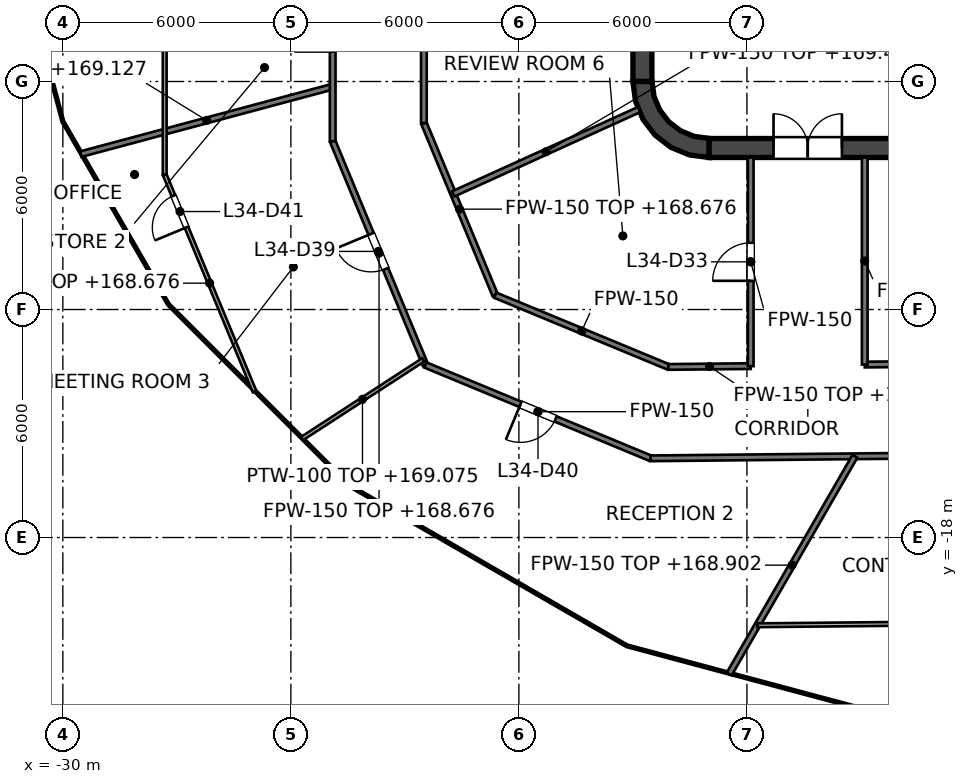
"""IFC4 building model, lengths in metres.
Left out: names, types, materials, properties, quantities, classifications, styles, units other than length and angle.
Written with IfcOpenShell. Run it as: python <this file> out.ifc"""

import sys

from ifc_helpers import new_model, si_unit, direction, frame, frame_2d, origin, place, context, subcontext, project, spatial, polyline, rectangle, outline, extrude, element, fill, save


model = new_model("IFC4")
c1 = context("Model", 3, precision=1e-05, world=origin(), true_north=direction((0.0, 1.0)))
c2 = subcontext(c1, "Body", "Model", "MODEL_VIEW")
j1 = project(units=[si_unit("LENGTHUNIT", "METRE"), si_unit("PLANEANGLEUNIT", "RADIAN")], contexts=[c1])
p1 = place(None, origin())
s1 = spatial("IfcSite", under=j1, at=p1, CompositionType="ELEMENT")
p2 = place(p1, origin())
s2 = spatial("IfcBuilding", under=s1, at=p2, CompositionType="ELEMENT")
p3 = place(p2, frame((0.0, 0.0, 165.6)))
s3 = spatial("IfcBuildingStorey", under=s2, at=p3, CompositionType="ELEMENT", Elevation=165.6)
p4 = place(p3, frame((-13.0, -7.75, 0.0), z_axis=(0.0, 0.0, 1.0), x_axis=(1.0, 0.0, 0.0)))
e1 = element("IfcWall", 1, at=p4, inside=s3, PredefinedType="SHEAR", context=c2, shape_type="SweptSolid", body=[
    extrude(rectangle(XDim=26.0, YDim=0.5, at=frame_2d((13.0, 0.0))), origin(), (0.0, 0.0, 1.0), 4.0),
])
p5 = place(p4, frame((1.7, 0.0, 0.0)))
e2 = element("IfcOpeningElement", 2, at=p5, cuts=e1, PredefinedType="OPENING", context=c2, shape_type="SweptSolid", body=[
    extrude(rectangle(XDim=1.8, YDim=2.1, at=frame_2d((0.9, 1.05))), frame((0.0, 0.25, 0.0), z_axis=(0.0, -1.0, 0.0), x_axis=(1.0, 0.0, 0.0)), (0.0, 0.0, 1.0), 0.5),
])
p6 = place(p4, frame((22.5, 0.0, 0.0)))
e3 = element("IfcOpeningElement", 3, at=p6, cuts=e1, PredefinedType="OPENING", context=c2, shape_type="SweptSolid", body=[
    extrude(rectangle(XDim=1.8, YDim=2.1, at=frame_2d((0.9, 1.05))), frame((0.0, 0.25, 0.0), z_axis=(0.0, -1.0, 0.0), x_axis=(1.0, 0.0, 0.0)), (0.0, 0.0, 1.0), 0.5),
])
p7 = place(p3, frame((-14.75, -6.0, 0.0), z_axis=(0.0, 0.0, 1.0), x_axis=(0.0, 1.0, 0.0)))
e4 = element("IfcWall", 4, at=p7, inside=s3, PredefinedType="SHEAR", context=c2, shape_type="SweptSolid", body=[
    extrude(rectangle(XDim=12.0, YDim=0.5, at=frame_2d((6.0, 0.0))), origin(), (0.0, 0.0, 1.0), 4.0),
])
p8 = place(p3, origin())
e5 = element("IfcWall", 5, at=p8, inside=s3, PredefinedType="SHEAR", context=c2, shape_type="SweptSolid", body=[
    extrude(outline(polyline([(-13.0, -8.0), (-13.0, -7.496), (-13.387, -7.445), (-13.748, -7.295), (-14.058, -7.058), (-14.295, -6.748), (-14.445, -6.387), (-14.496, -6.0), (-15.0, -6.0), (-14.932, -6.518), (-14.732, -7.0), (-14.414, -7.414), (-14.0, -7.732), (-13.518, -7.932), (-13.0, -8.0)])), origin(), (0.0, 0.0, 1.0), 4.0),
])
p9 = place(p3, frame((-9.0, -6.6, 0.0), z_axis=(0.0, 0.0, 1.0), x_axis=(0.0, 1.0, 0.0)))
e6 = element("IfcWall", 6, at=p9, inside=s3, PredefinedType="PARTITIONING", context=c2, shape_type="SweptSolid", body=[
    extrude(rectangle(XDim=2.5, YDim=0.25, at=frame_2d((1.25, 0.0))), origin(), (0.0, 0.0, 1.0), 3.85),
])
p10 = place(p9, frame((0.75, 0.0, 0.0)))
e7 = element("IfcOpeningElement", 7, at=p10, cuts=e6, PredefinedType="OPENING", context=c2, shape_type="SweptSolid", body=[
    extrude(rectangle(XDim=1.0, YDim=2.1, at=frame_2d((0.5, 1.05))), frame((0.0, 0.125, 0.0), z_axis=(0.0, -1.0, 0.0), x_axis=(1.0, 0.0, 0.0)), (0.0, 0.0, 1.0), 0.25),
])
p11 = place(p3, frame((-9.125, -7.05, 0.0), z_axis=(0.0, 0.0, 1.0), x_axis=(1.0, 0.0, 0.0)))
e8 = element("IfcWall", 8, at=p11, inside=s3, PredefinedType="SOLIDWALL", context=c2, shape_type="SweptSolid", body=[
    extrude(rectangle(XDim=18.25, YDim=0.9, at=frame_2d((9.125, 0.0))), origin(), (0.0, 0.0, 1.0), 3.85),
])
p12 = place(p3, frame((-11.8, -7.5, 0.0), z_axis=(0.0, 0.0, 1.0), x_axis=(0.0, 1.0, 0.0)))
e9 = element("IfcWall", 9, at=p12, inside=s3, PredefinedType="SOLIDWALL", context=c2, shape_type="SweptSolid", body=[
    extrude(rectangle(XDim=15.0, YDim=0.4, at=frame_2d((7.5, 0.0))), origin(), (0.0, 0.0, 1.0), 3.85),
])
p13 = place(p12, frame((11.3, 0.0, 0.0)))
e10 = element("IfcOpeningElement", 10, at=p13, cuts=e9, PredefinedType="OPENING", context=c2, shape_type="SweptSolid", body=[
    extrude(rectangle(XDim=1.1, YDim=2.1, at=frame_2d((0.55, 1.05))), frame((0.0, 0.2, 0.0), z_axis=(0.0, -1.0, 0.0), x_axis=(1.0, 0.0, 0.0)), (0.0, 0.0, 1.0), 0.4),
])
p14 = place(p12, frame((8.4, 0.0, 0.0)))
e11 = element("IfcOpeningElement", 11, at=p14, cuts=e9, PredefinedType="OPENING", context=c2, shape_type="SweptSolid", body=[
    extrude(rectangle(XDim=1.1, YDim=2.1, at=frame_2d((0.55, 1.05))), frame((0.0, 0.2, 0.0), z_axis=(0.0, -1.0, 0.0), x_axis=(1.0, 0.0, 0.0)), (0.0, 0.0, 1.0), 0.4),
])
p15 = place(p12, frame((5.5, 0.0, 0.0)))
e12 = element("IfcOpeningElement", 12, at=p15, cuts=e9, PredefinedType="OPENING", context=c2, shape_type="SweptSolid", body=[
    extrude(rectangle(XDim=1.1, YDim=2.1, at=frame_2d((0.55, 1.05))), frame((0.0, 0.2, 0.0), z_axis=(0.0, -1.0, 0.0), x_axis=(1.0, 0.0, 0.0)), (0.0, 0.0, 1.0), 0.4),
])
p16 = place(p12, frame((13.697, 0.0, 0.0)))
e13 = element("IfcOpeningElement", 13, at=p16, cuts=e9, PredefinedType="OPENING", context=c2, shape_type="SweptSolid", body=[
    extrude(rectangle(XDim=0.9, YDim=2.1, at=frame_2d((0.45, 1.05))), frame((0.0, 0.2, 0.0), z_axis=(0.0, -1.0, 0.0), x_axis=(1.0, 0.0, 0.0)), (0.0, 0.0, 1.0), 0.4),
])
p17 = place(p12, frame((0.403, 0.0, 0.0)))
e14 = element("IfcOpeningElement", 14, at=p17, cuts=e9, PredefinedType="OPENING", context=c2, shape_type="SweptSolid", body=[
    extrude(rectangle(XDim=0.9, YDim=2.1, at=frame_2d((0.45, 1.05))), frame((0.0, 0.2, 0.0), z_axis=(0.0, -1.0, 0.0), x_axis=(1.0, 0.0, 0.0)), (0.0, 0.0, 1.0), 0.4),
])
e15 = element("IfcWall", 15, at=p8, inside=s3, PredefinedType="SOLIDWALL", context=c2, shape_type="SweptSolid", body=[
    extrude(outline(polyline([(-12.0, -5.925), (-12.0, -5.675), (-14.25, -5.675), (-14.25, -3.025), (-12.0, -3.025), (-12.0, -2.775), (-14.25, -2.775), (-14.25, -0.125), (-12.0, -0.125), (-12.0, 0.125), (-14.25, 0.125), (-14.25, 2.775), (-12.0, 2.775), (-12.0, 3.025), (-14.25, 3.025), (-14.25, 5.675), (-12.0, 5.675), (-12.0, 5.925), (-14.25, 5.925), (-14.5, 5.925), (-14.5, 5.675), (-14.5, 3.025), (-14.5, 2.775), (-14.5, 0.125), (-14.5, -0.125), (-14.5, -2.775), (-14.5, -3.025), (-14.5, -5.675), (-14.5, -5.925), (-14.25, -5.925), (-12.0, -5.925)])), origin(), (0.0, 0.0, 1.0), 3.85),
])
p18 = place(p3, frame((-22.9, -7.572, 0.0), z_axis=(0.0, 0.0, 1.0), x_axis=(0.382860357704, -0.923806227788, 0.0)))
e16 = element("IfcWall", 16, at=p18, inside=s3, PredefinedType="PARTITIONING", context=c2, shape_type="SweptSolid", body=[
    extrude(rectangle(XDim=6.374, YDim=0.15, at=frame_2d((3.187, 0.0))), origin(), (0.0, 0.0, 1.0), 3.076),
])
p19 = place(p18, frame((2.638, 0.0, 0.0)))
e17 = element("IfcOpeningElement", 17, at=p19, cuts=e16, PredefinedType="OPENING", context=c2, shape_type="SweptSolid", body=[
    extrude(rectangle(XDim=1.0, YDim=2.1, at=frame_2d((0.5, 1.05))), frame((0.0, 0.075, 0.0), z_axis=(0.0, -1.0, 0.0), x_axis=(1.0, 0.0, 0.0)), (0.0, 0.0, 1.0), 0.15),
])
p20 = place(p3, frame((-20.5, -7.095, 0.0), z_axis=(0.0, 0.0, 1.0), x_axis=(0.382878184095, -0.923798839653, 0.0)))
e18 = element("IfcWall", 18, at=p20, inside=s3, PredefinedType="PARTITIONING", context=c2, shape_type="SweptSolid", body=[
    extrude(rectangle(XDim=4.902, YDim=0.15, at=frame_2d((2.451, 0.0))), origin(), (0.0, 0.0, 1.0), 3.076),
])
p21 = place(p3, frame((-20.46, -13.46, 0.0), z_axis=(0.0, 0.0, 1.0), x_axis=(0.923801547606, -0.382871650349, 0.0)))
e19 = element("IfcWall", 19, at=p21, inside=s3, PredefinedType="PARTITIONING", context=c2, shape_type="SweptSolid", body=[
    extrude(rectangle(XDim=6.415, YDim=0.15, at=frame_2d((3.208, 0.0))), origin(), (0.0, 0.0, 1.0), 2.927),
])
p22 = place(p21, frame((2.707, 0.0, 0.0)))
e20 = element("IfcOpeningElement", 20, at=p22, cuts=e19, PredefinedType="OPENING", context=c2, shape_type="SweptSolid", body=[
    extrude(rectangle(XDim=1.0, YDim=2.1, at=frame_2d((0.5, 1.05))), frame((0.0, 0.075, 0.0), z_axis=(0.0, -1.0, 0.0), x_axis=(1.0, 0.0, 0.0)), (0.0, 0.0, 1.0), 0.15),
])
p23 = place(p3, frame((-18.623, -11.623, 0.0), z_axis=(0.0, 0.0, 1.0), x_axis=(0.923791670587, -0.38289548098, 0.0)))
e21 = element("IfcWall", 21, at=p23, inside=s3, PredefinedType="PARTITIONING", context=c2, shape_type="SweptSolid", body=[
    extrude(rectangle(XDim=4.931, YDim=0.15, at=frame_2d((2.465, 0.0))), origin(), (0.0, 0.0, 1.0), 2.927),
])
p24 = place(p3, frame((-14.534, -15.916, 0.0), z_axis=(0.0, 0.0, 1.0), x_axis=(0.999950930262, 0.009906415532, 0.0)))
e22 = element("IfcWall", 22, at=p24, inside=s3, PredefinedType="PARTITIONING", context=c2, shape_type="SweptSolid", body=[
    extrude(rectangle(XDim=33.123, YDim=0.15, at=frame_2d((16.561, 0.0))), origin(), (0.0, 0.0, 1.0), 2.927),
])
p25 = place(p24, frame((16.111, 0.0, 0.0)))
e23 = element("IfcOpeningElement", 23, at=p25, cuts=e22, PredefinedType="OPENING", context=c2, shape_type="SweptSolid", body=[
    extrude(rectangle(XDim=1.0, YDim=2.1, at=frame_2d((0.5, 1.05))), frame((0.0, 0.075, 0.0), z_axis=(0.0, -1.0, 0.0), x_axis=(1.0, 0.0, 0.0)), (0.0, 0.0, 1.0), 0.15),
])
p26 = place(p24, frame((21.869, 0.0, 0.0)))
e24 = element("IfcOpeningElement", 24, at=p26, cuts=e22, PredefinedType="OPENING", context=c2, shape_type="SweptSolid", body=[
    extrude(rectangle(XDim=1.0, YDim=2.1, at=frame_2d((0.5, 1.05))), frame((0.0, 0.075, 0.0), z_axis=(0.0, -1.0, 0.0), x_axis=(1.0, 0.0, 0.0)), (0.0, 0.0, 1.0), 0.15),
])
p27 = place(p24, frame((29.106, 0.0, 0.0)))
e25 = element("IfcOpeningElement", 25, at=p27, cuts=e22, PredefinedType="OPENING", context=c2, shape_type="SweptSolid", body=[
    extrude(rectangle(XDim=1.0, YDim=2.1, at=frame_2d((0.5, 1.05))), frame((0.0, 0.075, 0.0), z_axis=(0.0, -1.0, 0.0), x_axis=(1.0, 0.0, 0.0)), (0.0, 0.0, 1.0), 0.15),
])
p28 = place(p3, frame((-14.068, -13.511, 0.0), z_axis=(0.0, 0.0, 1.0), x_axis=(0.999950911515, 0.009908307647, 0.0)))
e26 = element("IfcWall", 26, at=p28, inside=s3, PredefinedType="PARTITIONING", context=c2, shape_type="SweptSolid", body=[
    extrude(rectangle(XDim=2.168, YDim=0.15, at=frame_2d((1.084, 0.0))), origin(), (0.0, 0.0, 1.0), 3.076),
])
p29 = place(p3, frame((-8.9, -13.449, 0.0), z_axis=(0.0, 0.0, 1.0), x_axis=(0.999951105691, 0.009888691875, 0.0)))
e27 = element("IfcWall", 27, at=p29, inside=s3, PredefinedType="PARTITIONING", context=c2, shape_type="SweptSolid", body=[
    extrude(rectangle(XDim=17.801, YDim=0.15, at=frame_2d((8.9, 0.0))), origin(), (0.0, 0.0, 1.0), 2.927),
])
p30 = place(p29, frame((4.019, 0.0, 0.0)))
e28 = element("IfcOpeningElement", 28, at=p30, cuts=e27, PredefinedType="OPENING", context=c2, shape_type="SweptSolid", body=[
    extrude(rectangle(XDim=1.0, YDim=2.1, at=frame_2d((0.5, 1.05))), frame((0.0, 0.075, 0.0), z_axis=(0.0, -1.0, 0.0), x_axis=(1.0, 0.0, 0.0)), (0.0, 0.0, 1.0), 0.15),
])
p31 = place(p29, frame((12.873, 0.0, 0.0)))
e29 = element("IfcOpeningElement", 29, at=p31, cuts=e27, PredefinedType="OPENING", context=c2, shape_type="SweptSolid", body=[
    extrude(rectangle(XDim=1.0, YDim=2.1, at=frame_2d((0.5, 1.05))), frame((0.0, 0.075, 0.0), z_axis=(0.0, -1.0, 0.0), x_axis=(1.0, 0.0, 0.0)), (0.0, 0.0, 1.0), 0.15),
])
p32 = place(p3, frame((-29.528, -7.912, 0.0), z_axis=(0.0, 0.0, 1.0), x_axis=(0.965910567046, 0.258875986659, 0.0)))
e30 = element("IfcWall", 30, at=p32, inside=s3, PredefinedType="PARTITIONING", context=c2, shape_type="SweptSolid", body=[
    extrude(rectangle(XDim=6.862, YDim=0.15, at=frame_2d((3.431, 0.0))), origin(), (0.0, 0.0, 1.0), 3.527),
])
p33 = place(p3, frame((-19.728, -8.958, 0.0), z_axis=(0.0, 0.0, 1.0), x_axis=(0.910629511797, 0.413223779863, 0.0)))
e31 = element("IfcWall", 31, at=p33, inside=s3, PredefinedType="PARTITIONING", context=c2, shape_type="SweptSolid", body=[
    extrude(rectangle(XDim=5.368, YDim=0.15, at=frame_2d((2.684, 0.0))), origin(), (0.0, 0.0, 1.0), 3.85),
])
p34 = place(p3, frame((-12.466, -21.592, 0.0), z_axis=(0.0, 0.0, 1.0), x_axis=(0.500008890998, 0.866020270503, 0.0)))
e32 = element("IfcWall", 32, at=p34, inside=s3, PredefinedType="PARTITIONING", context=c2, shape_type="SweptSolid", body=[
    extrude(rectangle(XDim=6.616, YDim=0.15, at=frame_2d((3.308, 0.0))), origin(), (0.0, 0.0, 1.0), 3.302),
])
p35 = place(p3, frame((-8.9, -13.449, 0.0), z_axis=(0.0, 0.0, 1.0), x_axis=(0.0, 1.0, 0.0)))
e33 = element("IfcWall", 33, at=p35, inside=s3, PredefinedType="PARTITIONING", context=c2, shape_type="SweptSolid", body=[
    extrude(rectangle(XDim=5.449, YDim=0.15, at=frame_2d((2.725, 0.0))), origin(), (0.0, 0.0, 1.0), 2.927),
])
p36 = place(p3, frame((-11.9, -13.49, 0.0), z_axis=(0.0, 0.0, 1.0), x_axis=(0.0, 1.0, 0.0)))
e34 = element("IfcWall", 34, at=p36, inside=s3, PredefinedType="PARTITIONING", context=c2, shape_type="SweptSolid", body=[
    extrude(rectangle(XDim=5.49, YDim=0.15, at=frame_2d((2.745, 0.0))), origin(), (0.0, 0.0, 1.0), 2.927),
])
p37 = place(p36, frame((2.245, 0.0, 0.0)))
e35 = element("IfcOpeningElement", 35, at=p37, cuts=e34, PredefinedType="OPENING", context=c2, shape_type="SweptSolid", body=[
    extrude(rectangle(XDim=1.0, YDim=2.1, at=frame_2d((0.5, 1.05))), frame((0.0, 0.075, 0.0), z_axis=(0.0, -1.0, 0.0), x_axis=(1.0, 0.0, 0.0)), (0.0, 0.0, 1.0), 0.15),
])
p38 = place(p3, frame((-20.5, -7.095, 0.0), z_axis=(0.0, 0.0, 1.0), x_axis=(0.0, 1.0, 0.0)))
e36 = element("IfcWall", 36, at=p38, inside=s3, PredefinedType="PARTITIONING", context=c2, shape_type="SweptSolid", body=[
    extrude(rectangle(XDim=14.569, YDim=0.15, at=frame_2d((7.285, 0.0))), origin(), (0.0, 0.0, 1.0), 2.877),
])
p39 = place(p38, frame((10.234, 0.0, 0.0)))
e37 = element("IfcOpeningElement", 37, at=p39, cuts=e36, PredefinedType="OPENING", context=c2, shape_type="SweptSolid", body=[
    extrude(rectangle(XDim=1.0, YDim=2.1, at=frame_2d((0.5, 1.05))), frame((0.0, 0.075, 0.0), z_axis=(0.0, -1.0, 0.0), x_axis=(1.0, 0.0, 0.0)), (0.0, 0.0, 1.0), 0.15),
])
p40 = place(p38, frame((3.0, 0.0, 0.0)))
e38 = element("IfcOpeningElement", 38, at=p40, cuts=e36, PredefinedType="OPENING", context=c2, shape_type="SweptSolid", body=[
    extrude(rectangle(XDim=1.0, YDim=2.1, at=frame_2d((0.5, 1.05))), frame((0.0, 0.075, 0.0), z_axis=(0.0, -1.0, 0.0), x_axis=(1.0, 0.0, 0.0)), (0.0, 0.0, 1.0), 0.15),
])
p41 = place(p3, frame((-22.9, -7.572, 0.0), z_axis=(0.0, 0.0, 1.0), x_axis=(0.0, 1.0, 0.0)))
e39 = element("IfcWall", 39, at=p41, inside=s3, PredefinedType="PARTITIONING", context=c2, shape_type="SweptSolid", body=[
    extrude(rectangle(XDim=15.689, YDim=0.15, at=frame_2d((7.844, 0.0))), origin(), (0.0, 0.0, 1.0), 2.877),
])
p42 = place(p41, frame((5.614, 0.0, 0.0)))
e40 = element("IfcOpeningElement", 40, at=p42, cuts=e39, PredefinedType="OPENING", context=c2, shape_type="SweptSolid", body=[
    extrude(rectangle(XDim=1.0, YDim=2.1, at=frame_2d((0.5, 1.05))), frame((0.0, 0.075, 0.0), z_axis=(0.0, -1.0, 0.0), x_axis=(1.0, 0.0, 0.0)), (0.0, 0.0, 1.0), 0.15),
])
p43 = place(p41, frame((2.361, 0.0, 0.0)))
e41 = element("IfcOpeningElement", 41, at=p43, cuts=e39, PredefinedType="OPENING", context=c2, shape_type="SweptSolid", body=[
    extrude(rectangle(XDim=1.0, YDim=2.1, at=frame_2d((0.5, 1.05))), frame((0.0, 0.075, 0.0), z_axis=(0.0, -1.0, 0.0), x_axis=(1.0, 0.0, 0.0)), (0.0, 0.0, 1.0), 0.15),
])
p44 = place(p3, frame((-27.32, -8.452, 0.0), z_axis=(0.0, 0.0, 1.0), x_axis=(0.382783190585, -0.923838204993, 0.0)))
e42 = element("IfcWall", 42, at=p44, inside=s3, PredefinedType="PARTITIONING", context=c2, shape_type="SweptSolid", body=[
    extrude(rectangle(XDim=6.181, YDim=0.1, at=frame_2d((3.09, 0.0))), origin(), (0.0, 0.0, 1.0), 3.076),
])
p45 = place(p44, frame((0.6, 0.0, 0.0)))
e43 = element("IfcOpeningElement", 43, at=p45, cuts=e42, PredefinedType="OPENING", context=c2, shape_type="SweptSolid", body=[
    extrude(rectangle(XDim=0.9, YDim=2.1, at=frame_2d((0.45, 1.05))), frame((0.0, 0.05, 0.0), z_axis=(0.0, -1.0, 0.0), x_axis=(1.0, 0.0, 0.0)), (0.0, 0.0, 1.0), 0.1),
])
p46 = place(p3, frame((-11.725, -20.309, 0.0), z_axis=(0.0, 0.0, 1.0), x_axis=(0.999951318094, 0.009867190168, 0.0)))
e44 = element("IfcWall", 44, at=p46, inside=s3, PredefinedType="PARTITIONING", context=c2, shape_type="SweptSolid", body=[
    extrude(rectangle(XDim=17.122, YDim=0.1, at=frame_2d((8.561, 0.0))), origin(), (0.0, 0.0, 1.0), 2.927),
])
p47 = place(p46, frame((8.21, 0.0, 0.0)))
e45 = element("IfcOpeningElement", 45, at=p47, cuts=e44, PredefinedType="OPENING", context=c2, shape_type="SweptSolid", body=[
    extrude(rectangle(XDim=0.9, YDim=2.1, at=frame_2d((0.45, 1.05))), frame((0.0, 0.05, 0.0), z_axis=(0.0, -1.0, 0.0), x_axis=(1.0, 0.0, 0.0)), (0.0, 0.0, 1.0), 0.1),
])
p48 = place(p3, frame((-23.715, -15.401, 0.0), z_axis=(0.0, 0.0, 1.0), x_axis=(0.838658579265, 0.544657495519, 0.0)))
e46 = element("IfcWall", 46, at=p48, inside=s3, PredefinedType="PARTITIONING", context=c2, shape_type="SweptSolid", body=[
    extrude(rectangle(XDim=3.813, YDim=0.1, at=frame_2d((1.907, 0.0))), origin(), (0.0, 0.0, 1.0), 3.475),
])
p49 = place(p3, frame((-27.32, -8.452, 0.0), z_axis=(0.0, 0.0, 1.0), x_axis=(0.0, 1.0, 0.0)))
e47 = element("IfcWall", 47, at=p49, inside=s3, PredefinedType="PARTITIONING", context=c2, shape_type="SweptSolid", body=[
    extrude(rectangle(XDim=17.753, YDim=0.1, at=frame_2d((8.876, 0.0))), origin(), (0.0, 0.0, 1.0), 2.877),
])
p50 = place(p49, frame((12.012, 0.0, 0.0)))
e48 = element("IfcOpeningElement", 48, at=p50, cuts=e47, PredefinedType="OPENING", context=c2, shape_type="SweptSolid", body=[
    extrude(rectangle(XDim=0.9, YDim=2.1, at=frame_2d((0.45, 1.05))), frame((0.0, 0.05, 0.0), z_axis=(0.0, -1.0, 0.0), x_axis=(1.0, 0.0, 0.0)), (0.0, 0.0, 1.0), 0.1),
])
p51 = place(p10, origin())
e49 = element("IfcDoor", 49, at=p51, inside=s3, OperationType="SINGLE_SWING_LEFT", PredefinedType="DOOR", context=c2, shape_type="SweptSolid", body=[
    extrude(rectangle(XDim=1.0, YDim=2.1, at=frame_2d((0.5, 1.05))), frame((0.0, 0.025, 0.0), z_axis=(0.0, -1.0, 0.0), x_axis=(1.0, 0.0, 0.0)), (0.0, 0.0, 1.0), 0.05),
])
fill(e7, e49)
p52 = place(p17, origin())
e50 = element("IfcDoor", 50, at=p52, inside=s3, OperationType="SINGLE_SWING_LEFT", PredefinedType="DOOR", context=c2, shape_type="SweptSolid", body=[
    extrude(rectangle(XDim=0.9, YDim=2.1, at=frame_2d((0.45, 1.05))), frame((0.0, 0.025, 0.0), z_axis=(0.0, -1.0, 0.0), x_axis=(1.0, 0.0, 0.0)), (0.0, 0.0, 1.0), 0.05),
])
fill(e14, e50)
p53 = place(p5, origin())
e51 = element("IfcDoor", 51, at=p53, inside=s3, OperationType="DOUBLE_DOOR_SINGLE_SWING", PredefinedType="DOOR", context=c2, shape_type="SweptSolid", body=[
    extrude(rectangle(XDim=1.8, YDim=2.1, at=frame_2d((0.9, 1.05))), frame((0.0, 0.025, 0.0), z_axis=(0.0, -1.0, 0.0), x_axis=(1.0, 0.0, 0.0)), (0.0, 0.0, 1.0), 0.05),
])
fill(e2, e51)
p54 = place(p37, origin())
e52 = element("IfcDoor", 52, at=p54, inside=s3, OperationType="SINGLE_SWING_LEFT", PredefinedType="DOOR", context=c2, shape_type="SweptSolid", body=[
    extrude(rectangle(XDim=1.0, YDim=2.1, at=frame_2d((0.5, 1.05))), frame((0.0, 0.025, 0.0), z_axis=(0.0, -1.0, 0.0), x_axis=(1.0, 0.0, 0.0)), (0.0, 0.0, 1.0), 0.05),
])
fill(e35, e52)
p55 = place(p19, origin())
e53 = element("IfcDoor", 53, at=p55, inside=s3, OperationType="SINGLE_SWING_LEFT", PredefinedType="DOOR", context=c2, shape_type="SweptSolid", body=[
    extrude(rectangle(XDim=1.0, YDim=2.1, at=frame_2d((0.5, 1.05))), frame((0.0, 0.025, 0.0), z_axis=(0.0, -1.0, 0.0), x_axis=(1.0, 0.0, 0.0)), (0.0, 0.0, 1.0), 0.05),
])
fill(e17, e53)
p56 = place(p22, origin())
e54 = element("IfcDoor", 54, at=p56, inside=s3, OperationType="SINGLE_SWING_LEFT", PredefinedType="DOOR", context=c2, shape_type="SweptSolid", body=[
    extrude(rectangle(XDim=1.0, YDim=2.1, at=frame_2d((0.5, 1.05))), frame((0.0, 0.025, 0.0), z_axis=(0.0, -1.0, 0.0), x_axis=(1.0, 0.0, 0.0)), (0.0, 0.0, 1.0), 0.05),
])
fill(e20, e54)
p57 = place(p45, origin())
e55 = element("IfcDoor", 55, at=p57, inside=s3, OperationType="SINGLE_SWING_RIGHT", PredefinedType="DOOR", context=c2, shape_type="SweptSolid", body=[
    extrude(rectangle(XDim=0.9, YDim=2.1, at=frame_2d((0.45, 1.05))), frame((0.0, 0.025, 0.0), z_axis=(0.0, -1.0, 0.0), x_axis=(1.0, 0.0, 0.0)), (0.0, 0.0, 1.0), 0.05),
])
fill(e43, e55)
save(model, sys.argv[1])
